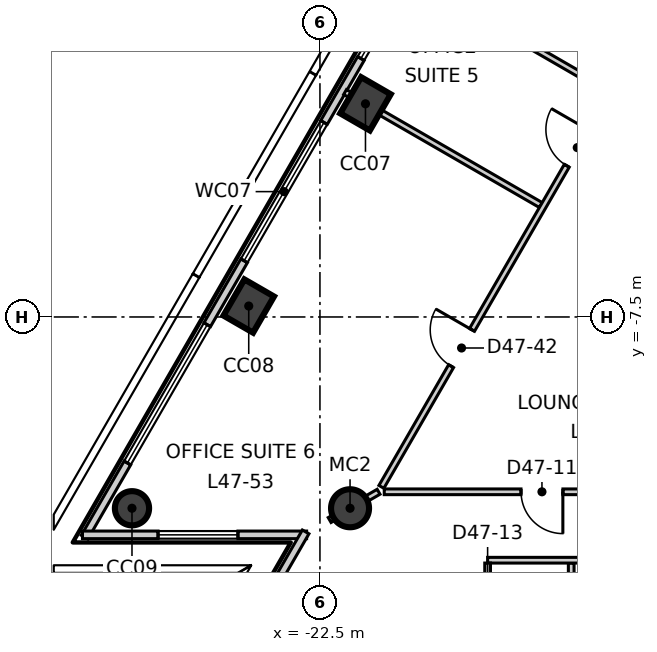
"""IFC4 building model, lengths in metres.
Left out: names, types, materials, properties, quantities, classifications, styles, units other than length and angle.
Written with IfcOpenShell. Run it as: python <this file> out.ifc"""

import sys

from ifc_helpers import new_model, si_unit, direction, frame, frame_2d, origin, origin_2d, place, context, subcontext, project, spatial, rectangle, circle, extrude, element, fill, save


model = new_model("IFC4")
c1 = context("Model", 3, precision=1e-05, world=origin(), true_north=direction((0.0, 1.0)))
c2 = subcontext(c1, "Body", "Model", "MODEL_VIEW")
j1 = project(units=[si_unit("LENGTHUNIT", "METRE"), si_unit("PLANEANGLEUNIT", "RADIAN")], contexts=[c1])
p1 = place(None, origin())
s1 = spatial("IfcSite", under=j1, at=p1, CompositionType="ELEMENT")
p2 = place(p1, origin())
s2 = spatial("IfcBuilding", under=s1, at=p2, CompositionType="ELEMENT")
p3 = place(p2, frame((0.0, 0.0, 203.3)))
s3 = spatial("IfcBuildingStorey", under=s2, at=p3, CompositionType="ELEMENT", Elevation=203.3)
for number, where, z_axis, x_axis in (
    (1, (-21.302, -1.891, -0.3), (0.0, 0.0, 1.0), (0.5, 0.866, 0.0)),
    (2, (-24.374, -7.212, -0.3), (0.0, 0.0, 1.0), (0.5, 0.866, 0.0)),
):
    element("IfcColumn", number, at=place(p3, frame(where, z_axis=z_axis, x_axis=x_axis)), inside=s3, PredefinedType="COLUMN", context=c2, shape_type="SweptSolid", body=[
        extrude(rectangle(XDim=1.1, YDim=0.9, at=origin_2d()), origin(), (0.0, 0.0, 1.0), 4.0),
    ])
p4 = place(p3, frame((-27.446, -12.533, -0.3), z_axis=(0.0, 0.0, 1.0), x_axis=(0.5, 0.866025403784, 0.0)))
e3 = element("IfcColumn", 3, at=p4, inside=s3, PredefinedType="COLUMN", context=c2, shape_type="SweptSolid", body=[
    extrude(circle(Radius=0.45, at=origin_2d()), origin(), (0.0, 0.0, 1.0), 4.0),
])
p5 = place(p3, frame((-21.708, -12.533, -0.3), z_axis=(0.0, 0.0, 1.0), x_axis=(1.0, 0.0, 0.0)))
e4 = element("IfcColumn", 4, at=p5, inside=s3, PredefinedType="COLUMN", context=c2, shape_type="SweptSolid", body=[
    extrude(circle(Radius=0.5, at=origin_2d()), origin(), (0.0, 0.0, 1.0), 4.0),
])
p6 = place(p3, frame((-2.824, 31.513, 0.0), z_axis=(0.0, 0.0, 1.0), x_axis=(-0.500012324412, -0.866018288165, 0.0)))
e5 = element("IfcWall", 5, at=p6, inside=s3, PredefinedType="ELEMENTEDWALL", context=c2, shape_type="SweptSolid", body=[
    extrude(rectangle(XDim=51.739, YDim=0.2, at=frame_2d((25.87, 0.0))), origin(), (0.0, 0.0, 1.0), 3.7),
])
p7 = place(p6, frame((2.275, 0.0, 0.9)))
e6 = element("IfcOpeningElement", 6, at=p7, cuts=e5, PredefinedType="OPENING", context=c2, shape_type="SweptSolid", body=[
    extrude(rectangle(XDim=4.2, YDim=2.5, at=frame_2d((2.1, 1.25))), frame((0.0, 0.11, 0.0), z_axis=(0.0, -1.0, 0.0), x_axis=(1.0, 0.0, 0.0)), (0.0, 0.0, 1.0), 0.22),
])
p8 = place(p6, frame((8.419, 0.0, 0.9)))
e7 = element("IfcOpeningElement", 7, at=p8, cuts=e5, PredefinedType="OPENING", context=c2, shape_type="SweptSolid", body=[
    extrude(rectangle(XDim=4.2, YDim=2.5, at=frame_2d((2.1, 1.25))), frame((0.0, 0.11, 0.0), z_axis=(0.0, -1.0, 0.0), x_axis=(1.0, 0.0, 0.0)), (0.0, 0.0, 1.0), 0.22),
])
p9 = place(p6, frame((14.563, 0.0, 0.9)))
e8 = element("IfcOpeningElement", 8, at=p9, cuts=e5, PredefinedType="OPENING", context=c2, shape_type="SweptSolid", body=[
    extrude(rectangle(XDim=4.2, YDim=2.5, at=frame_2d((2.1, 1.25))), frame((0.0, 0.11, 0.0), z_axis=(0.0, -1.0, 0.0), x_axis=(1.0, 0.0, 0.0)), (0.0, 0.0, 1.0), 0.22),
])
p10 = place(p6, frame((20.707, 0.0, 0.9)))
e9 = element("IfcOpeningElement", 9, at=p10, cuts=e5, PredefinedType="OPENING", context=c2, shape_type="SweptSolid", body=[
    extrude(rectangle(XDim=4.2, YDim=2.5, at=frame_2d((2.1, 1.25))), frame((0.0, 0.11, 0.0), z_axis=(0.0, -1.0, 0.0), x_axis=(1.0, 0.0, 0.0)), (0.0, 0.0, 1.0), 0.22),
])
p11 = place(p6, frame((26.851, 0.0, 0.9)))
e10 = element("IfcOpeningElement", 10, at=p11, cuts=e5, PredefinedType="OPENING", context=c2, shape_type="SweptSolid", body=[
    extrude(rectangle(XDim=4.2, YDim=2.5, at=frame_2d((2.1, 1.25))), frame((0.0, 0.11, 0.0), z_axis=(0.0, -1.0, 0.0), x_axis=(1.0, 0.0, 0.0)), (0.0, 0.0, 1.0), 0.22),
])
p12 = place(p6, frame((32.995, 0.0, 0.9)))
e11 = element("IfcOpeningElement", 11, at=p12, cuts=e5, PredefinedType="OPENING", context=c2, shape_type="SweptSolid", body=[
    extrude(rectangle(XDim=4.2, YDim=2.5, at=frame_2d((2.1, 1.25))), frame((0.0, 0.11, 0.0), z_axis=(0.0, -1.0, 0.0), x_axis=(1.0, 0.0, 0.0)), (0.0, 0.0, 1.0), 0.22),
])
p13 = place(p6, frame((39.14, 0.0, 0.9)))
e12 = element("IfcOpeningElement", 12, at=p13, cuts=e5, PredefinedType="OPENING", context=c2, shape_type="SweptSolid", body=[
    extrude(rectangle(XDim=4.2, YDim=2.5, at=frame_2d((2.1, 1.25))), frame((0.0, 0.11, 0.0), z_axis=(0.0, -1.0, 0.0), x_axis=(1.0, 0.0, 0.0)), (0.0, 0.0, 1.0), 0.22),
])
p14 = place(p6, frame((45.284, 0.0, 0.9)))
e13 = element("IfcOpeningElement", 13, at=p14, cuts=e5, PredefinedType="OPENING", context=c2, shape_type="SweptSolid", body=[
    extrude(rectangle(XDim=4.2, YDim=2.5, at=frame_2d((2.1, 1.25))), frame((0.0, 0.11, 0.0), z_axis=(0.0, -1.0, 0.0), x_axis=(1.0, 0.0, 0.0)), (0.0, 0.0, 1.0), 0.22),
])
p15 = place(p3, frame((-28.749, -13.233, 0.0), z_axis=(0.0, 0.0, 1.0), x_axis=(1.0, 0.0, 0.0)))
e14 = element("IfcWall", 14, at=p15, inside=s3, PredefinedType="ELEMENTEDWALL", context=c2, shape_type="SweptSolid", body=[
    extrude(rectangle(XDim=5.898, YDim=0.2, at=frame_2d((2.949, 0.0))), origin(), (0.0, 0.0, 1.0), 3.7),
])
p16 = place(p15, frame((1.99, 0.0, 0.9)))
e15 = element("IfcOpeningElement", 15, at=p16, cuts=e14, PredefinedType="OPENING", context=c2, shape_type="SweptSolid", body=[
    extrude(rectangle(XDim=2.1, YDim=2.5, at=frame_2d((1.05, 1.25))), frame((0.0, 0.11, 0.0), z_axis=(0.0, -1.0, 0.0), x_axis=(1.0, 0.0, 0.0)), (0.0, 0.0, 1.0), 0.22),
])
p17 = place(p3, frame((-22.876, -13.155, 0.0), z_axis=(0.0, 0.0, 1.0), x_axis=(-0.499989993172, -0.866031181152, 0.0)))
e16 = element("IfcWall", 16, at=p17, inside=s3, PredefinedType="ELEMENTEDWALL", context=c2, shape_type="SweptSolid", body=[
    extrude(rectangle(XDim=5.898, YDim=0.2, at=frame_2d((2.949, 0.0))), origin(), (0.0, 0.0, 1.0), 3.7),
])
p18 = place(p17, frame((1.39, 0.0, 0.9)))
e17 = element("IfcOpeningElement", 17, at=p18, cuts=e16, PredefinedType="OPENING", context=c2, shape_type="SweptSolid", body=[
    extrude(rectangle(XDim=2.1, YDim=2.5, at=frame_2d((1.05, 1.25))), frame((0.0, 0.11, 0.0), z_axis=(0.0, -1.0, 0.0), x_axis=(1.0, 0.0, 0.0)), (0.0, 0.0, 1.0), 0.22),
])
p19 = place(p3, frame((-22.245, -12.843, 0.0), z_axis=(0.0, 0.0, 1.0), x_axis=(0.865961433946, 0.500110782645, 0.0)))
e18 = element("IfcWall", 18, at=p19, inside=s3, PredefinedType="PARTITIONING", context=c2, shape_type="SweptSolid", body=[
    extrude(rectangle(XDim=1.488, YDim=0.15, at=frame_2d((0.744, 0.0))), origin(), (0.0, 0.0, 1.0), 3.2),
])
p20 = place(p3, frame((-21.839, -1.581, 0.0), z_axis=(0.0, 0.0, 1.0), x_axis=(0.866034527326, -0.49998419723, 0.0)))
e19 = element("IfcWall", 19, at=p20, inside=s3, PredefinedType="PARTITIONING", context=c2, shape_type="SweptSolid", body=[
    extrude(rectangle(XDim=5.948, YDim=0.15, at=frame_2d((2.974, 0.0))), origin(), (0.0, 0.0, 1.0), 3.7),
])
p21 = place(p3, frame((-20.883, -11.97, 0.0), z_axis=(0.0, 0.0, 1.0), x_axis=(0.500006150555, 0.866021852731, 0.0)))
e20 = element("IfcWall", 20, at=p21, inside=s3, PredefinedType="PARTITIONING", context=c2, shape_type="SweptSolid", body=[
    extrude(rectangle(XDim=41.766, YDim=0.15, at=frame_2d((20.883, 0.0))), origin(), (0.0, 0.0, 1.0), 3.7),
])
p22 = place(p21, frame((36.916, 0.0, 0.0)))
e21 = element("IfcOpeningElement", 21, at=p22, cuts=e20, PredefinedType="OPENING", context=c2, shape_type="SweptSolid", body=[
    extrude(rectangle(XDim=1.1, YDim=2.1, at=frame_2d((0.55, 1.05))), frame((0.0, 0.085, 0.0), z_axis=(0.0, -1.0, 0.0), x_axis=(1.0, 0.0, 0.0)), (0.0, 0.0, 1.0), 0.17),
])
p23 = place(p21, frame((26.446, 0.0, 0.0)))
e22 = element("IfcOpeningElement", 22, at=p23, cuts=e20, PredefinedType="OPENING", context=c2, shape_type="SweptSolid", body=[
    extrude(rectangle(XDim=1.1, YDim=2.1, at=frame_2d((0.55, 1.05))), frame((0.0, 0.085, 0.0), z_axis=(0.0, -1.0, 0.0), x_axis=(1.0, 0.0, 0.0)), (0.0, 0.0, 1.0), 0.17),
])
p24 = place(p21, frame((9.757, 0.0, 0.0)))
e23 = element("IfcOpeningElement", 23, at=p24, cuts=e20, PredefinedType="OPENING", context=c2, shape_type="SweptSolid", body=[
    extrude(rectangle(XDim=1.1, YDim=2.1, at=frame_2d((0.55, 1.05))), frame((0.0, 0.085, 0.0), z_axis=(0.0, -1.0, 0.0), x_axis=(1.0, 0.0, 0.0)), (0.0, 0.0, 1.0), 0.17),
])
p25 = place(p21, frame((18.757, 0.0, 0.0)))
e24 = element("IfcOpeningElement", 24, at=p25, cuts=e20, PredefinedType="OPENING", context=c2, shape_type="SweptSolid", body=[
    extrude(rectangle(XDim=0.9, YDim=2.1, at=frame_2d((0.45, 1.05))), frame((0.0, 0.085, 0.0), z_axis=(0.0, -1.0, 0.0), x_axis=(1.0, 0.0, 0.0)), (0.0, 0.0, 1.0), 0.17),
])
p26 = place(p21, frame((15.557, 0.0, 0.0)))
e25 = element("IfcOpeningElement", 25, at=p26, cuts=e20, PredefinedType="OPENING", context=c2, shape_type="SweptSolid", body=[
    extrude(rectangle(XDim=0.9, YDim=2.1, at=frame_2d((0.45, 1.05))), frame((0.0, 0.085, 0.0), z_axis=(0.0, -1.0, 0.0), x_axis=(1.0, 0.0, 0.0)), (0.0, 0.0, 1.0), 0.17),
])
p27 = place(p21, frame((12.657, 0.0, 0.0)))
e26 = element("IfcOpeningElement", 26, at=p27, cuts=e20, PredefinedType="OPENING", context=c2, shape_type="SweptSolid", body=[
    extrude(rectangle(XDim=1.0, YDim=2.1, at=frame_2d((0.5, 1.05))), frame((0.0, 0.085, 0.0), z_axis=(0.0, -1.0, 0.0), x_axis=(1.0, 0.0, 0.0)), (0.0, 0.0, 1.0), 0.17),
])
p28 = place(p21, frame((3.669, 0.0, 0.0)))
e27 = element("IfcOpeningElement", 27, at=p28, cuts=e20, PredefinedType="OPENING", context=c2, shape_type="SweptSolid", body=[
    extrude(rectangle(XDim=1.1, YDim=2.1, at=frame_2d((0.55, 1.05))), frame((0.0, 0.085, 0.0), z_axis=(0.0, -1.0, 0.0), x_axis=(1.0, 0.0, 0.0)), (0.0, 0.0, 1.0), 0.17),
])
p29 = place(p3, frame((-20.808, -12.1, 0.0), z_axis=(0.0, 0.0, 1.0), x_axis=(1.0, 0.0, 0.0)))
e28 = element("IfcWall", 28, at=p29, inside=s3, PredefinedType="PARTITIONING", context=c2, shape_type="SweptSolid", body=[
    extrude(rectangle(XDim=41.766, YDim=0.15, at=frame_2d((20.883, 0.0))), origin(), (0.0, 0.0, 1.0), 3.7),
])
p30 = place(p29, frame((3.6, 0.0, 0.0)))
e29 = element("IfcOpeningElement", 29, at=p30, cuts=e28, PredefinedType="OPENING", context=c2, shape_type="SweptSolid", body=[
    extrude(rectangle(XDim=1.1, YDim=2.1, at=frame_2d((0.55, 1.05))), frame((0.0, 0.085, 0.0), z_axis=(0.0, -1.0, 0.0), x_axis=(1.0, 0.0, 0.0)), (0.0, 0.0, 1.0), 0.17),
])
p31 = place(p29, frame((17.07, 0.0, 0.0)))
e30 = element("IfcOpeningElement", 30, at=p31, cuts=e28, PredefinedType="OPENING", context=c2, shape_type="SweptSolid", body=[
    extrude(rectangle(XDim=1.1, YDim=2.1, at=frame_2d((0.55, 1.05))), frame((0.0, 0.085, 0.0), z_axis=(0.0, -1.0, 0.0), x_axis=(1.0, 0.0, 0.0)), (0.0, 0.0, 1.0), 0.17),
])
p32 = place(p29, frame((9.87, 0.0, 0.0)))
e31 = element("IfcOpeningElement", 31, at=p32, cuts=e28, PredefinedType="OPENING", context=c2, shape_type="SweptSolid", body=[
    extrude(rectangle(XDim=0.9, YDim=2.1, at=frame_2d((0.45, 1.05))), frame((0.0, 0.085, 0.0), z_axis=(0.0, -1.0, 0.0), x_axis=(1.0, 0.0, 0.0)), (0.0, 0.0, 1.0), 0.17),
])
p33 = place(p29, frame((12.87, 0.0, 0.0)))
e32 = element("IfcOpeningElement", 32, at=p33, cuts=e28, PredefinedType="OPENING", context=c2, shape_type="SweptSolid", body=[
    extrude(rectangle(XDim=0.9, YDim=2.1, at=frame_2d((0.45, 1.05))), frame((0.0, 0.085, 0.0), z_axis=(0.0, -1.0, 0.0), x_axis=(1.0, 0.0, 0.0)), (0.0, 0.0, 1.0), 0.17),
])
p34 = place(p29, frame((27.658, 0.0, 0.0)))
e33 = element("IfcOpeningElement", 33, at=p34, cuts=e28, PredefinedType="OPENING", context=c2, shape_type="SweptSolid", body=[
    extrude(rectangle(XDim=1.0, YDim=2.1, at=frame_2d((0.5, 1.05))), frame((0.0, 0.085, 0.0), z_axis=(0.0, -1.0, 0.0), x_axis=(1.0, 0.0, 0.0)), (0.0, 0.0, 1.0), 0.17),
])
p35 = place(p29, frame((21.558, 0.0, 0.0)))
e34 = element("IfcOpeningElement", 34, at=p35, cuts=e28, PredefinedType="OPENING", context=c2, shape_type="SweptSolid", body=[
    extrude(rectangle(XDim=0.9, YDim=2.1, at=frame_2d((0.45, 1.05))), frame((0.0, 0.085, 0.0), z_axis=(0.0, -1.0, 0.0), x_axis=(1.0, 0.0, 0.0)), (0.0, 0.0, 1.0), 0.17),
])
p36 = place(p29, frame((36.847, 0.0, 0.0)))
e35 = element("IfcOpeningElement", 35, at=p36, cuts=e28, PredefinedType="OPENING", context=c2, shape_type="SweptSolid", body=[
    extrude(rectangle(XDim=1.1, YDim=2.1, at=frame_2d((0.55, 1.05))), frame((0.0, 0.085, 0.0), z_axis=(0.0, -1.0, 0.0), x_axis=(1.0, 0.0, 0.0)), (0.0, 0.0, 1.0), 0.17),
])
p37 = place(p3, frame((-17.456, -0.083, 0.0), z_axis=(0.0, 0.0, 1.0), x_axis=(0.865929066901, -0.500166823267, 0.0)))
e36 = element("IfcWall", 36, at=p37, inside=s3, PredefinedType="PARTITIONING", context=c2, shape_type="SweptSolid", body=[
    extrude(rectangle(XDim=2.901, YDim=0.15, at=frame_2d((1.45, 0.0))), origin(), (0.0, 0.0, 1.0), 3.7),
])
p38 = place(p3, frame((-15.888, -16.951, 0.0), z_axis=(0.0, 0.0, 1.0), x_axis=(0.0, 1.0, 0.0)))
e37 = element("IfcWall", 37, at=p38, inside=s3, PredefinedType="PARTITIONING", context=c2, shape_type="SweptSolid", body=[
    extrude(rectangle(XDim=2.976, YDim=0.15, at=frame_2d((1.488, 0.0))), origin(), (0.0, 0.0, 1.0), 3.7),
])
p39 = place(p3, frame((-18.088, -13.9, 0.0), z_axis=(0.0, 0.0, 1.0), x_axis=(1.0, 0.0, 0.0)))
e38 = element("IfcWall", 38, at=p39, inside=s3, PredefinedType="PARTITIONING", context=c2, shape_type="SweptSolid", body=[
    extrude(rectangle(XDim=5.725, YDim=0.15, at=frame_2d((2.862, 0.0))), origin(), (0.0, 0.0, 1.0), 3.7),
])
p40 = place(p39, frame((3.55, 0.0, 0.0)))
e39 = element("IfcOpeningElement", 39, at=p40, cuts=e38, PredefinedType="OPENING", context=c2, shape_type="SweptSolid", body=[
    extrude(rectangle(XDim=0.9, YDim=2.1, at=frame_2d((0.45, 1.05))), frame((0.0, 0.085, 0.0), z_axis=(0.0, -1.0, 0.0), x_axis=(1.0, 0.0, 0.0)), (0.0, 0.0, 1.0), 0.17),
])
p41 = place(p3, frame((-18.088, -16.9, 0.0), z_axis=(0.0, 0.0, 1.0), x_axis=(0.0, 1.0, 0.0)))
e40 = element("IfcWall", 40, at=p41, inside=s3, PredefinedType="PARTITIONING", context=c2, shape_type="SweptSolid", body=[
    extrude(rectangle(XDim=2.925, YDim=0.15, at=frame_2d((1.462, 0.0))), origin(), (0.0, 0.0, 1.0), 3.7),
])
p42 = place(p41, frame((1.05, 0.0, 0.0)))
e41 = element("IfcOpeningElement", 41, at=p42, cuts=e40, PredefinedType="OPENING", context=c2, shape_type="SweptSolid", body=[
    extrude(rectangle(XDim=0.9, YDim=2.1, at=frame_2d((0.45, 1.05))), frame((0.0, 0.085, 0.0), z_axis=(0.0, -1.0, 0.0), x_axis=(1.0, 0.0, 0.0)), (0.0, 0.0, 1.0), 0.17),
])
p43 = place(p12, origin())
e42 = element("IfcWindow", 42, at=p43, inside=s3, PartitioningType="SINGLE_PANEL", PredefinedType="WINDOW", context=c2, shape_type="SweptSolid", body=[
    extrude(rectangle(XDim=4.2, YDim=2.5, at=frame_2d((2.1, 1.25))), frame((0.0, 0.03, 0.0), z_axis=(0.0, -1.0, 0.0), x_axis=(1.0, 0.0, 0.0)), (0.0, 0.0, 1.0), 0.06),
])
fill(e11, e42)
p44 = place(p13, origin())
e43 = element("IfcWindow", 43, at=p44, inside=s3, PartitioningType="SINGLE_PANEL", PredefinedType="WINDOW", context=c2, shape_type="SweptSolid", body=[
    extrude(rectangle(XDim=4.2, YDim=2.5, at=frame_2d((2.1, 1.25))), frame((0.0, 0.03, 0.0), z_axis=(0.0, -1.0, 0.0), x_axis=(1.0, 0.0, 0.0)), (0.0, 0.0, 1.0), 0.06),
])
fill(e12, e43)
p45 = place(p14, origin())
e44 = element("IfcWindow", 44, at=p45, inside=s3, PartitioningType="SINGLE_PANEL", PredefinedType="WINDOW", context=c2, shape_type="SweptSolid", body=[
    extrude(rectangle(XDim=4.2, YDim=2.5, at=frame_2d((2.1, 1.25))), frame((0.0, 0.03, 0.0), z_axis=(0.0, -1.0, 0.0), x_axis=(1.0, 0.0, 0.0)), (0.0, 0.0, 1.0), 0.06),
])
fill(e13, e44)
p46 = place(p16, origin())
e45 = element("IfcWindow", 45, at=p46, inside=s3, PartitioningType="SINGLE_PANEL", PredefinedType="WINDOW", context=c2, shape_type="SweptSolid", body=[
    extrude(rectangle(XDim=2.1, YDim=2.5, at=frame_2d((1.05, 1.25))), frame((0.0, 0.03, 0.0), z_axis=(0.0, -1.0, 0.0), x_axis=(1.0, 0.0, 0.0)), (0.0, 0.0, 1.0), 0.06),
])
fill(e15, e45)
p47 = place(p30, origin())
e46 = element("IfcDoor", 46, at=p47, inside=s3, OperationType="SINGLE_SWING_RIGHT", PredefinedType="DOOR", context=c2, shape_type="SweptSolid", body=[
    extrude(rectangle(XDim=1.1, YDim=2.1, at=frame_2d((0.55, 1.05))), frame((0.0, 0.025, 0.0), z_axis=(0.0, -1.0, 0.0), x_axis=(1.0, 0.0, 0.0)), (0.0, 0.0, 1.0), 0.05),
])
fill(e29, e46)
p48 = place(p24, origin())
e47 = element("IfcDoor", 47, at=p48, inside=s3, OperationType="SINGLE_SWING_LEFT", PredefinedType="DOOR", context=c2, shape_type="SweptSolid", body=[
    extrude(rectangle(XDim=1.1, YDim=2.1, at=frame_2d((0.55, 1.05))), frame((0.0, 0.025, 0.0), z_axis=(0.0, -1.0, 0.0), x_axis=(1.0, 0.0, 0.0)), (0.0, 0.0, 1.0), 0.05),
])
fill(e23, e47)
p49 = place(p28, origin())
e48 = element("IfcDoor", 48, at=p49, inside=s3, OperationType="SINGLE_SWING_LEFT", PredefinedType="DOOR", context=c2, shape_type="SweptSolid", body=[
    extrude(rectangle(XDim=1.1, YDim=2.1, at=frame_2d((0.55, 1.05))), frame((0.0, 0.025, 0.0), z_axis=(0.0, -1.0, 0.0), x_axis=(1.0, 0.0, 0.0)), (0.0, 0.0, 1.0), 0.05),
])
fill(e27, e48)
save(model, sys.argv[1])
